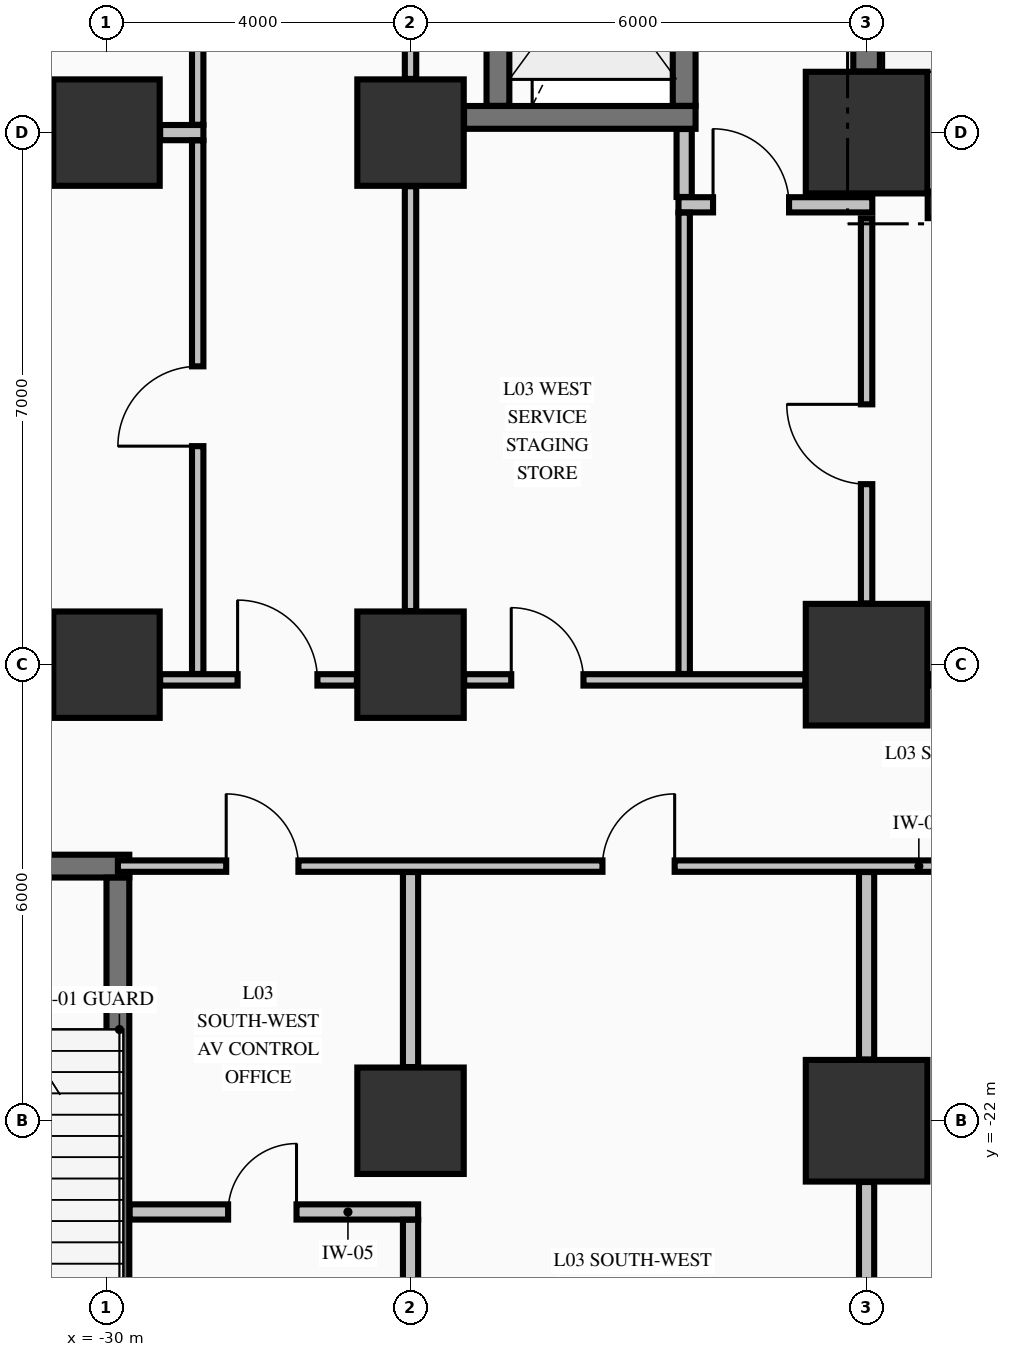
"""IFC4 building model, lengths in metres.
Left out: names, types, materials, properties, quantities, classifications, styles, units other than length and angle.
Written with IfcOpenShell. Run it as: python <this file> out.ifc"""

import sys

from ifc_helpers import new_model, si_unit, direction, frame, frame_2d, origin, origin_2d, place, context, subcontext, project, spatial, rectangle, extrude, element, fill, save


model = new_model("IFC4")
c1 = context("Model", 3, precision=1e-05, world=origin(), true_north=direction((0.0, 1.0)))
c2 = subcontext(c1, "Body", "Model", "MODEL_VIEW")
j1 = project(units=[si_unit("LENGTHUNIT", "METRE"), si_unit("PLANEANGLEUNIT", "RADIAN")], contexts=[c1])
p1 = place(None, origin())
s1 = spatial("IfcSite", under=j1, at=p1, CompositionType="ELEMENT")
p2 = place(p1, origin())
s2 = spatial("IfcBuilding", under=s1, at=p2, CompositionType="ELEMENT")
p3 = place(p2, frame((0.0, 0.0, 16.32)))
s3 = spatial("IfcBuildingStorey", under=s2, at=p3, CompositionType="ELEMENT", Elevation=16.32)
for number, where, z_axis, x_axis in (
    (1, (-30.0, -16.0, 0.0), (0.0, 0.0, 1.0), (1.0, 0.0, 0.0)),
    (2, (-30.0, -9.0, 0.0), (0.0, 0.0, 1.0), (1.0, 0.0, 0.0)),
    (3, (-26.0, -22.0, 0.0), (0.0, 0.0, 1.0), (1.0, 0.0, 0.0)),
    (4, (-26.0, -16.0, 0.0), (0.0, 0.0, 1.0), (1.0, 0.0, 0.0)),
    (5, (-26.0, -9.0, 0.0), (0.0, 0.0, 1.0), (1.0, 0.0, 0.0)),
):
    element("IfcColumn", number, at=place(p3, frame(where, z_axis=z_axis, x_axis=x_axis)), inside=s3, PredefinedType="COLUMN", context=c2, shape_type="SweptSolid", body=[
        extrude(rectangle(XDim=1.4, YDim=1.4, at=origin_2d()), origin(), (0.0, 0.0, 1.0), 4.99),
    ])
for number, where, z_axis, x_axis in (
    (6, (-20.0, -22.0, 0.0), (0.0, 0.0, 1.0), (1.0, 0.0, 0.0)),
    (7, (-20.0, -16.0, 0.0), (0.0, 0.0, 1.0), (1.0, 0.0, 0.0)),
    (8, (-20.0, -9.0, 0.0), (0.0, 0.0, 1.0), (1.0, 0.0, 0.0)),
):
    element("IfcColumn", number, at=place(p3, frame(where, z_axis=z_axis, x_axis=x_axis)), inside=s3, PredefinedType="COLUMN", context=c2, shape_type="SweptSolid", body=[
        extrude(rectangle(XDim=1.6, YDim=1.6, at=origin_2d()), origin(), (0.0, 0.0, 1.0), 4.99),
    ])
p4 = place(p3, frame((-33.835, -18.65, 0.0), z_axis=(0.0, 0.0, 1.0), x_axis=(1.0, 0.0, 0.0)))
e9 = element("IfcWall", 9, at=p4, inside=s3, PredefinedType="SHEAR", context=c2, shape_type="SweptSolid", body=[
    extrude(rectangle(XDim=4.135, YDim=0.3, at=frame_2d((2.067, 0.0))), origin(), (0.0, 0.0, 1.0), 4.99),
])
p5 = place(p4, frame((1.385, 0.0, 0.0)))
e10 = element("IfcOpeningElement", 10, at=p5, cuts=e9, PredefinedType="OPENING", context=c2, shape_type="SweptSolid", body=[
    extrude(rectangle(XDim=1.2, YDim=2.15, at=frame_2d((0.6, 1.075))), frame((0.0, 0.16, 0.0), z_axis=(0.0, -1.0, 0.0), x_axis=(1.0, 0.0, 0.0)), (0.0, 0.0, 1.0), 0.32),
])
p6 = place(p3, frame((-19.196, -9.95, 0.0), z_axis=(0.0, 0.0, 1.0), x_axis=(1.0, 0.0, 0.0)))
e11 = element("IfcWall", 11, at=p6, inside=s3, PredefinedType="SHEAR", context=c2, shape_type="SweptSolid", body=[
    extrude(rectangle(XDim=4.496, YDim=0.35, at=frame_2d((2.248, 0.0))), origin(), (0.0, 0.0, 1.0), 4.99),
])
p7 = place(p6, frame((0.371, 0.0, 0.0)))
e12 = element("IfcOpeningElement", 12, at=p7, cuts=e11, PredefinedType="OPENING", context=c2, shape_type="SweptSolid", body=[
    extrude(rectangle(XDim=1.05, YDim=2.15, at=frame_2d((0.525, 1.075))), frame((0.0, 0.185, 0.0), z_axis=(0.0, -1.0, 0.0), x_axis=(1.0, 0.0, 0.0)), (0.0, 0.0, 1.0), 0.37),
])
p8 = place(p3, frame((-25.296, -8.8, 0.0), z_axis=(0.0, 0.0, 1.0), x_axis=(1.0, 0.0, 0.0)))
e13 = element("IfcWall", 13, at=p8, inside=s3, PredefinedType="SHEAR", context=c2, shape_type="SweptSolid", body=[
    extrude(rectangle(XDim=3.046, YDim=0.3, at=frame_2d((1.523, 0.0))), origin(), (0.0, 0.0, 1.0), 4.99),
])
p9 = place(p3, frame((-29.697, -23.2, 0.0), z_axis=(0.0, 0.0, 1.0), x_axis=(1.0, 0.0, 0.0)))
e14 = element("IfcWall", 14, at=p9, inside=s3, PredefinedType="PARTITIONING", context=c2, shape_type="SweptSolid", body=[
    extrude(rectangle(XDim=3.797, YDim=0.2, at=frame_2d((1.898, 0.0))), origin(), (0.0, 0.0, 1.0), 4.99),
])
p10 = place(p9, frame((1.297, 0.0, 0.0)))
e15 = element("IfcOpeningElement", 15, at=p10, cuts=e14, PredefinedType="OPENING", context=c2, shape_type="SweptSolid", body=[
    extrude(rectangle(XDim=0.9, YDim=2.15, at=frame_2d((0.45, 1.075))), frame((0.0, 0.11, 0.0), z_axis=(0.0, -1.0, 0.0), x_axis=(1.0, 0.0, 0.0)), (0.0, 0.0, 1.0), 0.22),
])
p11 = place(p3, frame((-29.85, -18.65, 0.0), z_axis=(0.0, 0.0, 1.0), x_axis=(1.0, 0.0, 0.0)))
e16 = element("IfcWall", 16, at=p11, inside=s3, PredefinedType="PARTITIONING", context=c2, shape_type="SweptSolid", body=[
    extrude(rectangle(XDim=21.085, YDim=0.15, at=frame_2d((10.542, 0.0))), origin(), (0.0, 0.0, 1.0), 4.99),
])
p12 = place(p11, frame((1.425, 0.0, 0.0)))
e17 = element("IfcOpeningElement", 17, at=p12, cuts=e16, PredefinedType="OPENING", context=c2, shape_type="SweptSolid", body=[
    extrude(rectangle(XDim=0.95, YDim=2.15, at=frame_2d((0.475, 1.075))), frame((0.0, 0.085, 0.0), z_axis=(0.0, -1.0, 0.0), x_axis=(1.0, 0.0, 0.0)), (0.0, 0.0, 1.0), 0.17),
])
p13 = place(p11, frame((6.375, 0.0, 0.0)))
e18 = element("IfcOpeningElement", 18, at=p13, cuts=e16, PredefinedType="OPENING", context=c2, shape_type="SweptSolid", body=[
    extrude(rectangle(XDim=0.95, YDim=2.15, at=frame_2d((0.475, 1.075))), frame((0.0, 0.085, 0.0), z_axis=(0.0, -1.0, 0.0), x_axis=(1.0, 0.0, 0.0)), (0.0, 0.0, 1.0), 0.17),
])
p14 = place(p11, frame((13.75, 0.0, 0.0)))
e19 = element("IfcOpeningElement", 19, at=p14, cuts=e16, PredefinedType="OPENING", context=c2, shape_type="SweptSolid", body=[
    extrude(rectangle(XDim=1.2, YDim=2.15, at=frame_2d((0.6, 1.075))), frame((0.0, 0.085, 0.0), z_axis=(0.0, -1.0, 0.0), x_axis=(1.0, 0.0, 0.0)), (0.0, 0.0, 1.0), 0.17),
])
p15 = place(p11, frame((19.575, 0.0, 0.0)))
e20 = element("IfcOpeningElement", 20, at=p15, cuts=e16, PredefinedType="OPENING", context=c2, shape_type="SweptSolid", body=[
    extrude(rectangle(XDim=0.95, YDim=2.15, at=frame_2d((0.475, 1.075))), frame((0.0, 0.085, 0.0), z_axis=(0.0, -1.0, 0.0), x_axis=(1.0, 0.0, 0.0)), (0.0, 0.0, 1.0), 0.17),
])
p16 = place(p3, frame((-33.294, -16.2, 0.0), z_axis=(0.0, 0.0, 1.0), x_axis=(1.0, 0.0, 0.0)))
e21 = element("IfcWall", 21, at=p16, inside=s3, PredefinedType="PARTITIONING", context=c2, shape_type="SweptSolid", body=[
    extrude(rectangle(XDim=2.588, YDim=0.15, at=frame_2d((1.294, 0.0))), origin(), (0.0, 0.0, 1.0), 3.332),
])
p17 = place(p3, frame((-29.294, -16.2, 0.0), z_axis=(0.0, 0.0, 1.0), x_axis=(1.0, 0.0, 0.0)))
e22 = element("IfcWall", 22, at=p17, inside=s3, PredefinedType="PARTITIONING", context=c2, shape_type="SweptSolid", body=[
    extrude(rectangle(XDim=2.588, YDim=0.15, at=frame_2d((1.294, 0.0))), origin(), (0.0, 0.0, 1.0), 3.332),
])
p18 = place(p17, frame((1.019, 0.0, 0.0)))
e23 = element("IfcOpeningElement", 23, at=p18, cuts=e22, PredefinedType="OPENING", context=c2, shape_type="SweptSolid", body=[
    extrude(rectangle(XDim=1.05, YDim=2.15, at=frame_2d((0.525, 1.075))), frame((0.0, 0.085, 0.0), z_axis=(0.0, -1.0, 0.0), x_axis=(1.0, 0.0, 0.0)), (0.0, 0.0, 1.0), 0.17),
])
p19 = place(p3, frame((-25.294, -16.2, 0.0), z_axis=(0.0, 0.0, 1.0), x_axis=(1.0, 0.0, 0.0)))
e24 = element("IfcWall", 24, at=p19, inside=s3, PredefinedType="PARTITIONING", context=c2, shape_type="SweptSolid", body=[
    extrude(rectangle(XDim=4.488, YDim=0.15, at=frame_2d((2.244, 0.0))), origin(), (0.0, 0.0, 1.0), 3.332),
])
p20 = place(p19, frame((0.619, 0.0, 0.0)))
e25 = element("IfcOpeningElement", 25, at=p20, cuts=e24, PredefinedType="OPENING", context=c2, shape_type="SweptSolid", body=[
    extrude(rectangle(XDim=0.95, YDim=2.15, at=frame_2d((0.475, 1.075))), frame((0.0, 0.085, 0.0), z_axis=(0.0, -1.0, 0.0), x_axis=(1.0, 0.0, 0.0)), (0.0, 0.0, 1.0), 0.17),
])
p21 = place(p3, frame((-19.194, -16.2, 0.0), z_axis=(0.0, 0.0, 1.0), x_axis=(1.0, 0.0, 0.0)))
e26 = element("IfcWall", 26, at=p21, inside=s3, PredefinedType="PARTITIONING", context=c2, shape_type="SweptSolid", body=[
    extrude(rectangle(XDim=7.388, YDim=0.15, at=frame_2d((3.694, 0.0))), origin(), (0.0, 0.0, 1.0), 3.332),
])
p22 = place(p21, frame((3.094, 0.0, 0.0)))
e27 = element("IfcOpeningElement", 27, at=p22, cuts=e26, PredefinedType="OPENING", context=c2, shape_type="SweptSolid", body=[
    extrude(rectangle(XDim=1.2, YDim=2.15, at=frame_2d((0.6, 1.075))), frame((0.0, 0.085, 0.0), z_axis=(0.0, -1.0, 0.0), x_axis=(1.0, 0.0, 0.0)), (0.0, 0.0, 1.0), 0.17),
])
p23 = place(p3, frame((-22.475, -9.95, 0.0), z_axis=(0.0, 0.0, 1.0), x_axis=(1.0, 0.0, 0.0)))
e28 = element("IfcWall", 28, at=p23, inside=s3, PredefinedType="PARTITIONING", context=c2, shape_type="SweptSolid", body=[
    extrude(rectangle(XDim=2.55, YDim=0.2, at=frame_2d((1.275, 0.0))), origin(), (0.0, 0.0, 1.0), 4.99),
])
p24 = place(p23, frame((0.455, 0.0, 0.0)))
e29 = element("IfcOpeningElement", 29, at=p24, cuts=e28, PredefinedType="OPENING", context=c2, shape_type="SweptSolid", body=[
    extrude(rectangle(XDim=1.0, YDim=2.15, at=frame_2d((0.5, 1.075))), frame((0.0, 0.11, 0.0), z_axis=(0.0, -1.0, 0.0), x_axis=(1.0, 0.0, 0.0)), (0.0, 0.0, 1.0), 0.22),
])
p25 = place(p3, frame((-33.294, -9.0, 0.0), z_axis=(0.0, 0.0, 1.0), x_axis=(1.0, 0.0, 0.0)))
e30 = element("IfcWall", 30, at=p25, inside=s3, PredefinedType="PARTITIONING", context=c2, shape_type="SweptSolid", body=[
    extrude(rectangle(XDim=2.588, YDim=0.2, at=frame_2d((1.294, 0.0))), origin(), (0.0, 0.0, 1.0), 3.332),
])
p26 = place(p3, frame((-29.294, -9.0, 0.0), z_axis=(0.0, 0.0, 1.0), x_axis=(1.0, 0.0, 0.0)))
e31 = element("IfcWall", 31, at=p26, inside=s3, PredefinedType="PARTITIONING", context=c2, shape_type="SweptSolid", body=[
    extrude(rectangle(XDim=0.569, YDim=0.2, at=frame_2d((0.284, 0.0))), origin(), (0.0, 0.0, 1.0), 3.332),
])
p27 = place(p3, frame((-29.85, -28.296, 0.0), z_axis=(0.0, 0.0, 1.0), x_axis=(0.0, 1.0, 0.0)))
e32 = element("IfcWall", 32, at=p27, inside=s3, PredefinedType="SHEAR", context=c2, shape_type="SweptSolid", body=[
    extrude(rectangle(XDim=9.494, YDim=0.3, at=frame_2d((4.747, 0.0))), origin(), (0.0, 0.0, 1.0), 4.99),
])
p28 = place(p3, frame((-24.85, -8.648, 0.0), z_axis=(0.0, 0.0, 1.0), x_axis=(0.0, 1.0, 0.0)))
e33 = element("IfcWall", 33, at=p28, inside=s3, PredefinedType="SHEAR", context=c2, shape_type="SweptSolid", body=[
    extrude(rectangle(XDim=3.696, YDim=0.3, at=frame_2d((1.848, 0.0))), origin(), (0.0, 0.0, 1.0), 4.99),
])
p29 = place(p3, frame((-22.4, -8.648, 0.0), z_axis=(0.0, 0.0, 1.0), x_axis=(0.0, 1.0, 0.0)))
e34 = element("IfcWall", 34, at=p29, inside=s3, PredefinedType="SHEAR", context=c2, shape_type="SweptSolid", body=[
    extrude(rectangle(XDim=3.696, YDim=0.3, at=frame_2d((1.848, 0.0))), origin(), (0.0, 0.0, 1.0), 4.99),
])
p30 = place(p29, frame((1.198, 0.0, 0.0)))
e35 = element("IfcOpeningElement", 35, at=p30, cuts=e34, PredefinedType="OPENING", context=c2, shape_type="SweptSolid", body=[
    extrude(rectangle(XDim=1.3, YDim=2.3, at=frame_2d((0.65, 1.15))), frame((0.0, 0.16, 0.0), z_axis=(0.0, -1.0, 0.0), x_axis=(1.0, 0.0, 0.0)), (0.0, 0.0, 1.0), 0.32),
])
p31 = place(p3, frame((-20.0, -8.196, 0.0), z_axis=(0.0, 0.0, 1.0), x_axis=(0.0, 1.0, 0.0)))
e36 = element("IfcWall", 36, at=p31, inside=s3, PredefinedType="SHEAR", context=c2, shape_type="SweptSolid", body=[
    extrude(rectangle(XDim=7.392, YDim=0.35, at=frame_2d((3.696, 0.0))), origin(), (0.0, 0.0, 1.0), 4.99),
])
p32 = place(p3, frame((-28.8, -16.122, 0.0), z_axis=(0.0, 0.0, 1.0), x_axis=(0.0, 1.0, 0.0)))
e37 = element("IfcWall", 37, at=p32, inside=s3, PredefinedType="PARTITIONING", context=c2, shape_type="SweptSolid", body=[
    extrude(rectangle(XDim=7.019, YDim=0.15, at=frame_2d((3.51, 0.0))), origin(), (0.0, 0.0, 1.0), 4.99),
])
p33 = place(p32, frame((2.997, 0.0, 0.0)))
e38 = element("IfcOpeningElement", 38, at=p33, cuts=e37, PredefinedType="OPENING", context=c2, shape_type="SweptSolid", body=[
    extrude(rectangle(XDim=1.05, YDim=2.15, at=frame_2d((0.525, 1.075))), frame((0.0, 0.085, 0.0), z_axis=(0.0, -1.0, 0.0), x_axis=(1.0, 0.0, 0.0)), (0.0, 0.0, 1.0), 0.17),
])
p34 = place(p3, frame((-28.8, -8.897, 0.0), z_axis=(0.0, 0.0, 1.0), x_axis=(0.0, 1.0, 0.0)))
e39 = element("IfcWall", 39, at=p34, inside=s3, PredefinedType="PARTITIONING", context=c2, shape_type="SweptSolid", body=[
    extrude(rectangle(XDim=3.894, YDim=0.15, at=frame_2d((1.947, 0.0))), origin(), (0.0, 0.0, 1.0), 4.99),
])
p35 = place(p34, frame((1.422, 0.0, 0.0)))
e40 = element("IfcOpeningElement", 40, at=p35, cuts=e39, PredefinedType="OPENING", context=c2, shape_type="SweptSolid", body=[
    extrude(rectangle(XDim=1.05, YDim=2.15, at=frame_2d((0.525, 1.075))), frame((0.0, 0.085, 0.0), z_axis=(0.0, -1.0, 0.0), x_axis=(1.0, 0.0, 0.0)), (0.0, 0.0, 1.0), 0.17),
])
p36 = place(p3, frame((-26.0, -25.294, 0.0), z_axis=(0.0, 0.0, 1.0), x_axis=(0.0, 1.0, 0.0)))
e41 = element("IfcWall", 41, at=p36, inside=s3, PredefinedType="PARTITIONING", context=c2, shape_type="SweptSolid", body=[
    extrude(rectangle(XDim=1.991, YDim=0.2, at=frame_2d((0.996, 0.0))), origin(), (0.0, 0.0, 1.0), 3.332),
])
p37 = place(p3, frame((-26.0, -21.294, 0.0), z_axis=(0.0, 0.0, 1.0), x_axis=(0.0, 1.0, 0.0)))
e42 = element("IfcWall", 42, at=p37, inside=s3, PredefinedType="PARTITIONING", context=c2, shape_type="SweptSolid", body=[
    extrude(rectangle(XDim=2.566, YDim=0.2, at=frame_2d((1.283, 0.0))), origin(), (0.0, 0.0, 1.0), 3.332),
])
p38 = place(p3, frame((-26.0, -15.294, 0.0), z_axis=(0.0, 0.0, 1.0), x_axis=(0.0, 1.0, 0.0)))
e43 = element("IfcWall", 43, at=p38, inside=s3, PredefinedType="PARTITIONING", context=c2, shape_type="SweptSolid", body=[
    extrude(rectangle(XDim=5.588, YDim=0.15, at=frame_2d((2.794, 0.0))), origin(), (0.0, 0.0, 1.0), 3.332),
])
p39 = place(p3, frame((-26.0, -8.294, 0.0), z_axis=(0.0, 0.0, 1.0), x_axis=(0.0, 1.0, 0.0)))
e44 = element("IfcWall", 44, at=p39, inside=s3, PredefinedType="PARTITIONING", context=c2, shape_type="SweptSolid", body=[
    extrude(rectangle(XDim=7.341, YDim=0.15, at=frame_2d((3.67, 0.0))), origin(), (0.0, 0.0, 1.0), 3.332),
])
p40 = place(p3, frame((-22.4, -16.122, 0.0), z_axis=(0.0, 0.0, 1.0), x_axis=(0.0, 1.0, 0.0)))
e45 = element("IfcWall", 45, at=p40, inside=s3, PredefinedType="PARTITIONING", context=c2, shape_type="SweptSolid", body=[
    extrude(rectangle(XDim=6.069, YDim=0.15, at=frame_2d((3.035, 0.0))), origin(), (0.0, 0.0, 1.0), 4.99),
])
p41 = place(p3, frame((-22.4, -9.847, 0.0), z_axis=(0.0, 0.0, 1.0), x_axis=(0.0, 1.0, 0.0)))
e46 = element("IfcWall", 46, at=p41, inside=s3, PredefinedType="PARTITIONING", context=c2, shape_type="SweptSolid", body=[
    extrude(rectangle(XDim=0.894, YDim=0.2, at=frame_2d((0.447, 0.0))), origin(), (0.0, 0.0, 1.0), 4.99),
])
p42 = place(p3, frame((-20.0, -25.194, 0.0), z_axis=(0.0, 0.0, 1.0), x_axis=(0.0, 1.0, 0.0)))
e47 = element("IfcWall", 47, at=p42, inside=s3, PredefinedType="PARTITIONING", context=c2, shape_type="SweptSolid", body=[
    extrude(rectangle(XDim=2.388, YDim=0.2, at=frame_2d((1.194, 0.0))), origin(), (0.0, 0.0, 1.0), 3.332),
])
p43 = place(p3, frame((-20.0, -21.194, 0.0), z_axis=(0.0, 0.0, 1.0), x_axis=(0.0, 1.0, 0.0)))
e48 = element("IfcWall", 48, at=p43, inside=s3, PredefinedType="PARTITIONING", context=c2, shape_type="SweptSolid", body=[
    extrude(rectangle(XDim=2.466, YDim=0.2, at=frame_2d((1.233, 0.0))), origin(), (0.0, 0.0, 1.0), 3.332),
])
p44 = place(p3, frame((-20.0, -15.194, 0.0), z_axis=(0.0, 0.0, 1.0), x_axis=(0.0, 1.0, 0.0)))
e49 = element("IfcWall", 49, at=p44, inside=s3, PredefinedType="PARTITIONING", context=c2, shape_type="SweptSolid", body=[
    extrude(rectangle(XDim=5.066, YDim=0.15, at=frame_2d((2.533, 0.0))), origin(), (0.0, 0.0, 1.0), 4.99),
])
p45 = place(p44, frame((1.569, 0.0, 0.0)))
e50 = element("IfcOpeningElement", 50, at=p45, cuts=e49, PredefinedType="OPENING", context=c2, shape_type="SweptSolid", body=[
    extrude(rectangle(XDim=1.05, YDim=2.15, at=frame_2d((0.525, 1.075))), frame((0.0, 0.085, 0.0), z_axis=(0.0, -1.0, 0.0), x_axis=(1.0, 0.0, 0.0)), (0.0, 0.0, 1.0), 0.17),
])
p46 = place(p24, origin())
e51 = element("IfcDoor", 51, at=p46, inside=s3, OperationType="SINGLE_SWING_LEFT", PredefinedType="DOOR", context=c2, shape_type="SweptSolid", body=[
    extrude(rectangle(XDim=1.0, YDim=2.15, at=frame_2d((0.5, 1.075))), frame((0.0, 0.025, 0.0), z_axis=(0.0, -1.0, 0.0), x_axis=(1.0, 0.0, 0.0)), (0.0, 0.0, 1.0), 0.05),
])
fill(e29, e51)
p47 = place(p45, origin())
e52 = element("IfcDoor", 52, at=p47, inside=s3, OperationType="SINGLE_SWING_RIGHT", PredefinedType="DOOR", context=c2, shape_type="SweptSolid", body=[
    extrude(rectangle(XDim=1.05, YDim=2.15, at=frame_2d((0.525, 1.075))), frame((0.0, 0.025, 0.0), z_axis=(0.0, -1.0, 0.0), x_axis=(1.0, 0.0, 0.0)), (0.0, 0.0, 1.0), 0.05),
])
fill(e50, e52)
p48 = place(p20, origin())
e53 = element("IfcDoor", 53, at=p48, inside=s3, OperationType="SINGLE_SWING_LEFT", PredefinedType="DOOR", context=c2, shape_type="SweptSolid", body=[
    extrude(rectangle(XDim=0.95, YDim=2.15, at=frame_2d((0.475, 1.075))), frame((0.0, 0.025, 0.0), z_axis=(0.0, -1.0, 0.0), x_axis=(1.0, 0.0, 0.0)), (0.0, 0.0, 1.0), 0.05),
])
fill(e25, e53)
p49 = place(p18, origin())
e54 = element("IfcDoor", 54, at=p49, inside=s3, OperationType="SINGLE_SWING_LEFT", PredefinedType="DOOR", context=c2, shape_type="SweptSolid", body=[
    extrude(rectangle(XDim=1.05, YDim=2.15, at=frame_2d((0.525, 1.075))), frame((0.0, 0.025, 0.0), z_axis=(0.0, -1.0, 0.0), x_axis=(1.0, 0.0, 0.0)), (0.0, 0.0, 1.0), 0.05),
])
fill(e23, e54)
p50 = place(p33, origin())
e55 = element("IfcDoor", 55, at=p50, inside=s3, OperationType="SINGLE_SWING_LEFT", PredefinedType="DOOR", context=c2, shape_type="SweptSolid", body=[
    extrude(rectangle(XDim=1.05, YDim=2.15, at=frame_2d((0.525, 1.075))), frame((0.0, 0.025, 0.0), z_axis=(0.0, -1.0, 0.0), x_axis=(1.0, 0.0, 0.0)), (0.0, 0.0, 1.0), 0.05),
])
fill(e38, e55)
p51 = place(p10, origin())
e56 = element("IfcDoor", 56, at=p51, inside=s3, OperationType="SINGLE_SWING_RIGHT", PredefinedType="DOOR", context=c2, shape_type="SweptSolid", body=[
    extrude(rectangle(XDim=0.9, YDim=2.15, at=frame_2d((0.45, 1.075))), frame((0.0, 0.025, 0.0), z_axis=(0.0, -1.0, 0.0), x_axis=(1.0, 0.0, 0.0)), (0.0, 0.0, 1.0), 0.05),
])
fill(e15, e56)
p52 = place(p12, origin())
e57 = element("IfcDoor", 57, at=p52, inside=s3, OperationType="SINGLE_SWING_LEFT", PredefinedType="DOOR", context=c2, shape_type="SweptSolid", body=[
    extrude(rectangle(XDim=0.95, YDim=2.15, at=frame_2d((0.475, 1.075))), frame((0.0, 0.025, 0.0), z_axis=(0.0, -1.0, 0.0), x_axis=(1.0, 0.0, 0.0)), (0.0, 0.0, 1.0), 0.05),
])
fill(e17, e57)
p53 = place(p13, origin())
e58 = element("IfcDoor", 58, at=p53, inside=s3, OperationType="SINGLE_SWING_RIGHT", PredefinedType="DOOR", context=c2, shape_type="SweptSolid", body=[
    extrude(rectangle(XDim=0.95, YDim=2.15, at=frame_2d((0.475, 1.075))), frame((0.0, 0.025, 0.0), z_axis=(0.0, -1.0, 0.0), x_axis=(1.0, 0.0, 0.0)), (0.0, 0.0, 1.0), 0.05),
])
fill(e18, e58)
save(model, sys.argv[1])
